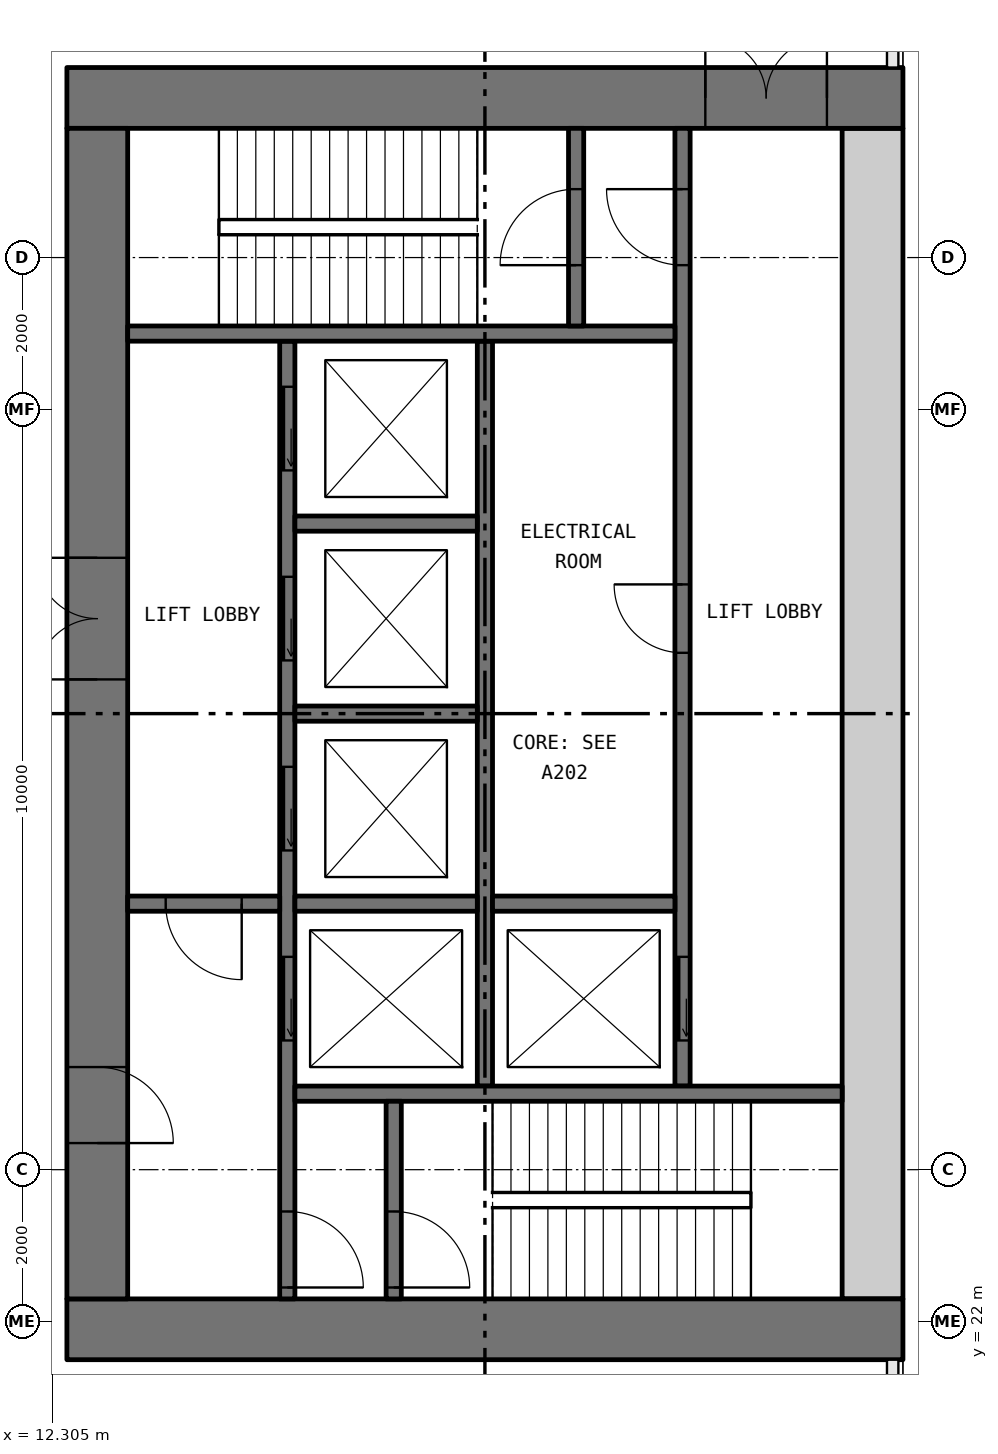
"""IFC4 building model, lengths in metres.
Left out: names, types, materials, properties, quantities, classifications, styles, units other than length and angle.
Written with IfcOpenShell. Run it as: python <this file> out.ifc"""

import sys

from ifc_helpers import new_model, si_unit, direction, frame, frame_2d, origin, place, context, subcontext, project, spatial, rectangle, extrude, element, fill, save


model = new_model("IFC4")
c1 = context("Model", 3, precision=1e-05, world=origin(), true_north=direction((0.0, 1.0)))
c2 = subcontext(c1, "Body", "Model", "MODEL_VIEW")
j1 = project(units=[si_unit("LENGTHUNIT", "METRE"), si_unit("PLANEANGLEUNIT", "RADIAN")], contexts=[c1])
p1 = place(None, origin())
s1 = spatial("IfcSite", under=j1, at=p1, CompositionType="ELEMENT")
p2 = place(p1, origin())
s2 = spatial("IfcBuilding", under=s1, at=p2, CompositionType="ELEMENT")
p3 = place(p2, frame((0.0, 0.0, 6.0)))
s3 = spatial("IfcBuildingStorey", under=s2, at=p3, CompositionType="ELEMENT", Elevation=6.0)
p4 = place(p3, frame((12.5, 21.9, 0.0), z_axis=(0.0, 0.0, 1.0), x_axis=(1.0, 0.0, 0.0)))
e1 = element("IfcWall", 1, at=p4, inside=s3, PredefinedType="SHEAR", context=c2, shape_type="SweptSolid", body=[
    extrude(rectangle(XDim=11.0, YDim=0.8, at=frame_2d((5.5, 0.0))), origin(), (0.0, 0.0, 1.0), 5.6),
])
p5 = place(p3, frame((12.5, 38.1, 0.0), z_axis=(0.0, 0.0, 1.0), x_axis=(1.0, 0.0, 0.0)))
e2 = element("IfcWall", 2, at=p5, inside=s3, PredefinedType="SHEAR", context=c2, shape_type="SweptSolid", body=[
    extrude(rectangle(XDim=11.0, YDim=0.8, at=frame_2d((5.5, 0.0))), origin(), (0.0, 0.0, 1.0), 5.6),
])
p6 = place(p5, frame((8.4, 0.0, 0.0)))
e3 = element("IfcOpeningElement", 3, at=p6, cuts=e2, PredefinedType="OPENING", context=c2, shape_type="SweptSolid", body=[
    extrude(rectangle(XDim=1.6, YDim=2.1, at=frame_2d((0.8, 1.05))), frame((0.0, 0.41, 0.0), z_axis=(0.0, -1.0, 0.0), x_axis=(1.0, 0.0, 0.0)), (0.0, 0.0, 1.0), 0.82),
])
p7 = place(p3, frame((12.9, 22.3, 0.0), z_axis=(0.0, 0.0, 1.0), x_axis=(0.0, 1.0, 0.0)))
e4 = element("IfcWall", 4, at=p7, inside=s3, PredefinedType="SHEAR", context=c2, shape_type="SweptSolid", body=[
    extrude(rectangle(XDim=15.4, YDim=0.8, at=frame_2d((7.7, 0.0))), origin(), (0.0, 0.0, 1.0), 5.6),
])
p8 = place(p7, frame((8.15, 0.0, 0.0)))
e5 = element("IfcOpeningElement", 5, at=p8, cuts=e4, PredefinedType="OPENING", context=c2, shape_type="SweptSolid", body=[
    extrude(rectangle(XDim=1.6, YDim=2.1, at=frame_2d((0.8, 1.05))), frame((0.0, 0.41, 0.0), z_axis=(0.0, -1.0, 0.0), x_axis=(1.0, 0.0, 0.0)), (0.0, 0.0, 1.0), 0.82),
])
p9 = place(p7, frame((2.05, 0.0, 0.0)))
e6 = element("IfcOpeningElement", 6, at=p9, cuts=e4, PredefinedType="OPENING", context=c2, shape_type="SweptSolid", body=[
    extrude(rectangle(XDim=1.0, YDim=2.1, at=frame_2d((0.5, 1.05))), frame((0.0, 0.41, 0.0), z_axis=(0.0, -1.0, 0.0), x_axis=(1.0, 0.0, 0.0)), (0.0, 0.0, 1.0), 0.82),
])
p10 = place(p3, frame((23.1, 22.3, 0.0), z_axis=(0.0, 0.0, 1.0), x_axis=(0.0, 1.0, 0.0)))
e7 = element("IfcWall", 7, at=p10, inside=s3, PredefinedType="SHEAR", context=c2, shape_type="SweptSolid", body=[
    extrude(rectangle(XDim=15.4, YDim=0.8, at=frame_2d((7.7, 0.0))), origin(), (0.0, 0.0, 1.0), 5.6),
])
p11 = place(p3, frame((15.4, 22.3, 0.0), z_axis=(0.0, 0.0, 1.0), x_axis=(0.0, 1.0, 0.0)))
e8 = element("IfcWall", 8, at=p11, inside=s3, PredefinedType="SOLIDWALL", context=c2, shape_type="SweptSolid", body=[
    extrude(rectangle(XDim=12.6, YDim=0.2, at=frame_2d((6.3, 0.0))), origin(), (0.0, 0.0, 1.0), 5.6),
])
p12 = place(p11, frame((3.4, 0.0, 0.0)))
e9 = element("IfcOpeningElement", 9, at=p12, cuts=e8, PredefinedType="OPENING", context=c2, shape_type="SweptSolid", body=[
    extrude(rectangle(XDim=1.1, YDim=2.1, at=frame_2d((0.55, 1.05))), frame((0.0, 0.11, 0.0), z_axis=(0.0, -1.0, 0.0), x_axis=(1.0, 0.0, 0.0)), (0.0, 0.0, 1.0), 0.22),
])
p13 = place(p11, frame((5.9, 0.0, 0.0)))
e10 = element("IfcOpeningElement", 10, at=p13, cuts=e8, PredefinedType="OPENING", context=c2, shape_type="SweptSolid", body=[
    extrude(rectangle(XDim=1.1, YDim=2.1, at=frame_2d((0.55, 1.05))), frame((0.0, 0.11, 0.0), z_axis=(0.0, -1.0, 0.0), x_axis=(1.0, 0.0, 0.0)), (0.0, 0.0, 1.0), 0.22),
])
p14 = place(p11, frame((8.4, 0.0, 0.0)))
e11 = element("IfcOpeningElement", 11, at=p14, cuts=e8, PredefinedType="OPENING", context=c2, shape_type="SweptSolid", body=[
    extrude(rectangle(XDim=1.1, YDim=2.1, at=frame_2d((0.55, 1.05))), frame((0.0, 0.11, 0.0), z_axis=(0.0, -1.0, 0.0), x_axis=(1.0, 0.0, 0.0)), (0.0, 0.0, 1.0), 0.22),
])
p15 = place(p11, frame((10.9, 0.0, 0.0)))
e12 = element("IfcOpeningElement", 12, at=p15, cuts=e8, PredefinedType="OPENING", context=c2, shape_type="SweptSolid", body=[
    extrude(rectangle(XDim=1.1, YDim=2.1, at=frame_2d((0.55, 1.05))), frame((0.0, 0.11, 0.0), z_axis=(0.0, -1.0, 0.0), x_axis=(1.0, 0.0, 0.0)), (0.0, 0.0, 1.0), 0.22),
])
p16 = place(p11, frame((0.15, 0.0, 0.0)))
e13 = element("IfcOpeningElement", 13, at=p16, cuts=e8, PredefinedType="OPENING", context=c2, shape_type="SweptSolid", body=[
    extrude(rectangle(XDim=1.0, YDim=2.1, at=frame_2d((0.5, 1.05))), frame((0.0, 0.11, 0.0), z_axis=(0.0, -1.0, 0.0), x_axis=(1.0, 0.0, 0.0)), (0.0, 0.0, 1.0), 0.22),
])
p17 = place(p3, frame((20.6, 25.1, 0.0), z_axis=(0.0, 0.0, 1.0), x_axis=(0.0, 1.0, 0.0)))
e14 = element("IfcWall", 14, at=p17, inside=s3, PredefinedType="SOLIDWALL", context=c2, shape_type="SweptSolid", body=[
    extrude(rectangle(XDim=12.6, YDim=0.2, at=frame_2d((6.3, 0.0))), origin(), (0.0, 0.0, 1.0), 5.6),
])
p18 = place(p17, frame((0.6, 0.0, 0.0)))
e15 = element("IfcOpeningElement", 15, at=p18, cuts=e14, PredefinedType="OPENING", context=c2, shape_type="SweptSolid", body=[
    extrude(rectangle(XDim=1.1, YDim=2.1, at=frame_2d((0.55, 1.05))), frame((0.0, 0.11, 0.0), z_axis=(0.0, -1.0, 0.0), x_axis=(1.0, 0.0, 0.0)), (0.0, 0.0, 1.0), 0.22),
])
p19 = place(p17, frame((10.8, 0.0, 0.0)))
e16 = element("IfcOpeningElement", 16, at=p19, cuts=e14, PredefinedType="OPENING", context=c2, shape_type="SweptSolid", body=[
    extrude(rectangle(XDim=1.0, YDim=2.1, at=frame_2d((0.5, 1.05))), frame((0.0, 0.11, 0.0), z_axis=(0.0, -1.0, 0.0), x_axis=(1.0, 0.0, 0.0)), (0.0, 0.0, 1.0), 0.22),
])
p20 = place(p17, frame((5.7, 0.0, 0.0)))
e17 = element("IfcOpeningElement", 17, at=p20, cuts=e14, PredefinedType="OPENING", context=c2, shape_type="SweptSolid", body=[
    extrude(rectangle(XDim=0.9, YDim=2.1, at=frame_2d((0.45, 1.05))), frame((0.0, 0.11, 0.0), z_axis=(0.0, -1.0, 0.0), x_axis=(1.0, 0.0, 0.0)), (0.0, 0.0, 1.0), 0.22),
])
p21 = place(p3, frame((18.0, 25.1, 0.0), z_axis=(0.0, 0.0, 1.0), x_axis=(0.0, 1.0, 0.0)))
e18 = element("IfcWall", 18, at=p21, inside=s3, PredefinedType="SOLIDWALL", context=c2, shape_type="SweptSolid", body=[
    extrude(rectangle(XDim=9.8, YDim=0.2, at=frame_2d((4.9, 0.0))), origin(), (0.0, 0.0, 1.0), 5.6),
])
for number, where, z_axis, x_axis in (
    (19, (15.5, 25.0, 0.0), (0.0, 0.0, 1.0), (1.0, 0.0, 0.0)),
    (20, (13.3, 35.0, 0.0), (0.0, 0.0, 1.0), (1.0, 0.0, 0.0)),
):
    element("IfcWall", number, at=place(p3, frame(where, z_axis=z_axis, x_axis=x_axis)), inside=s3, PredefinedType="SOLIDWALL", context=c2, shape_type="SweptSolid", body=[
        extrude(rectangle(XDim=7.2, YDim=0.2, at=frame_2d((3.6, 0.0))), origin(), (0.0, 0.0, 1.0), 5.6),
    ])
p22 = place(p3, frame((13.3, 27.5, 0.0), z_axis=(0.0, 0.0, 1.0), x_axis=(1.0, 0.0, 0.0)))
e21 = element("IfcWall", 21, at=p22, inside=s3, PredefinedType="SOLIDWALL", context=c2, shape_type="SweptSolid", body=[
    extrude(rectangle(XDim=2.0, YDim=0.2, at=frame_2d((1.0, 0.0))), origin(), (0.0, 0.0, 1.0), 5.6),
])
p23 = place(p22, frame((0.5, 0.0, 0.0)))
e22 = element("IfcOpeningElement", 22, at=p23, cuts=e21, PredefinedType="OPENING", context=c2, shape_type="SweptSolid", body=[
    extrude(rectangle(XDim=1.0, YDim=2.1, at=frame_2d((0.5, 1.05))), frame((0.0, 0.11, 0.0), z_axis=(0.0, -1.0, 0.0), x_axis=(1.0, 0.0, 0.0)), (0.0, 0.0, 1.0), 0.22),
])
p24 = place(p3, frame((16.8, 22.3, 0.0), z_axis=(0.0, 0.0, 1.0), x_axis=(0.0, 1.0, 0.0)))
e23 = element("IfcWall", 23, at=p24, inside=s3, PredefinedType="SOLIDWALL", context=c2, shape_type="SweptSolid", body=[
    extrude(rectangle(XDim=2.6, YDim=0.2, at=frame_2d((1.3, 0.0))), origin(), (0.0, 0.0, 1.0), 5.6),
])
p25 = place(p24, frame((0.15, 0.0, 0.0)))
e24 = element("IfcOpeningElement", 24, at=p25, cuts=e23, PredefinedType="OPENING", context=c2, shape_type="SweptSolid", body=[
    extrude(rectangle(XDim=1.0, YDim=2.1, at=frame_2d((0.5, 1.05))), frame((0.0, 0.11, 0.0), z_axis=(0.0, -1.0, 0.0), x_axis=(1.0, 0.0, 0.0)), (0.0, 0.0, 1.0), 0.22),
])
p26 = place(p3, frame((19.2, 35.1, 0.0), z_axis=(0.0, 0.0, 1.0), x_axis=(0.0, 1.0, 0.0)))
e25 = element("IfcWall", 25, at=p26, inside=s3, PredefinedType="SOLIDWALL", context=c2, shape_type="SweptSolid", body=[
    extrude(rectangle(XDim=2.6, YDim=0.2, at=frame_2d((1.3, 0.0))), origin(), (0.0, 0.0, 1.0), 5.6),
])
p27 = place(p26, frame((0.8, 0.0, 0.0)))
e26 = element("IfcOpeningElement", 26, at=p27, cuts=e25, PredefinedType="OPENING", context=c2, shape_type="SweptSolid", body=[
    extrude(rectangle(XDim=1.0, YDim=2.1, at=frame_2d((0.5, 1.05))), frame((0.0, 0.11, 0.0), z_axis=(0.0, -1.0, 0.0), x_axis=(1.0, 0.0, 0.0)), (0.0, 0.0, 1.0), 0.22),
])
for number, where, z_axis, x_axis in (
    (27, (15.5, 27.5, 0.0), (0.0, 0.0, 1.0), (1.0, 0.0, 0.0)),
    (28, (15.5, 30.0, 0.0), (0.0, 0.0, 1.0), (1.0, 0.0, 0.0)),
    (29, (15.5, 32.5, 0.0), (0.0, 0.0, 1.0), (1.0, 0.0, 0.0)),
    (30, (18.1, 27.5, 0.0), (0.0, 0.0, 1.0), (1.0, 0.0, 0.0)),
):
    element("IfcWall", number, at=place(p3, frame(where, z_axis=z_axis, x_axis=x_axis)), inside=s3, PredefinedType="SOLIDWALL", context=c2, shape_type="SweptSolid", body=[
        extrude(rectangle(XDim=2.4, YDim=0.2, at=frame_2d((1.2, 0.0))), origin(), (0.0, 0.0, 1.0), 5.6),
    ])
p28 = place(p18, origin())
e31 = element("IfcDoor", 31, at=p28, inside=s3, OperationType="SLIDING_TO_LEFT", PredefinedType="DOOR", context=c2, shape_type="SweptSolid", body=[
    extrude(rectangle(XDim=1.1, YDim=2.1, at=frame_2d((0.55, 1.05))), frame((0.0, 0.025, 0.0), z_axis=(0.0, -1.0, 0.0), x_axis=(1.0, 0.0, 0.0)), (0.0, 0.0, 1.0), 0.05),
])
fill(e15, e31)
p29 = place(p12, origin())
e32 = element("IfcDoor", 32, at=p29, inside=s3, OperationType="SLIDING_TO_LEFT", PredefinedType="DOOR", context=c2, shape_type="SweptSolid", body=[
    extrude(rectangle(XDim=1.1, YDim=2.1, at=frame_2d((0.55, 1.05))), frame((0.0, 0.025, 0.0), z_axis=(0.0, -1.0, 0.0), x_axis=(1.0, 0.0, 0.0)), (0.0, 0.0, 1.0), 0.05),
])
fill(e9, e32)
p30 = place(p13, origin())
e33 = element("IfcDoor", 33, at=p30, inside=s3, OperationType="SLIDING_TO_LEFT", PredefinedType="DOOR", context=c2, shape_type="SweptSolid", body=[
    extrude(rectangle(XDim=1.1, YDim=2.1, at=frame_2d((0.55, 1.05))), frame((0.0, 0.025, 0.0), z_axis=(0.0, -1.0, 0.0), x_axis=(1.0, 0.0, 0.0)), (0.0, 0.0, 1.0), 0.05),
])
fill(e10, e33)
p31 = place(p14, origin())
e34 = element("IfcDoor", 34, at=p31, inside=s3, OperationType="SLIDING_TO_LEFT", PredefinedType="DOOR", context=c2, shape_type="SweptSolid", body=[
    extrude(rectangle(XDim=1.1, YDim=2.1, at=frame_2d((0.55, 1.05))), frame((0.0, 0.025, 0.0), z_axis=(0.0, -1.0, 0.0), x_axis=(1.0, 0.0, 0.0)), (0.0, 0.0, 1.0), 0.05),
])
fill(e11, e34)
p32 = place(p15, origin())
e35 = element("IfcDoor", 35, at=p32, inside=s3, OperationType="SLIDING_TO_LEFT", PredefinedType="DOOR", context=c2, shape_type="SweptSolid", body=[
    extrude(rectangle(XDim=1.1, YDim=2.1, at=frame_2d((0.55, 1.05))), frame((0.0, 0.025, 0.0), z_axis=(0.0, -1.0, 0.0), x_axis=(1.0, 0.0, 0.0)), (0.0, 0.0, 1.0), 0.05),
])
fill(e12, e35)
p33 = place(p25, frame((1.0, 0.0, 0.0), x_axis=(-1.0, 0.0, 0.0)))
e36 = element("IfcDoor", 36, at=p33, inside=s3, OperationType="SINGLE_SWING_LEFT", PredefinedType="DOOR", context=c2, shape_type="SweptSolid", body=[
    extrude(rectangle(XDim=1.0, YDim=2.1, at=frame_2d((0.5, 1.05))), frame((0.0, 0.025, 0.0), z_axis=(0.0, -1.0, 0.0), x_axis=(1.0, 0.0, 0.0)), (0.0, 0.0, 1.0), 0.05),
])
fill(e24, e36)
p34 = place(p16, frame((1.0, 0.0, 0.0), x_axis=(-1.0, 0.0, 0.0)))
e37 = element("IfcDoor", 37, at=p34, inside=s3, OperationType="SINGLE_SWING_LEFT", PredefinedType="DOOR", context=c2, shape_type="SweptSolid", body=[
    extrude(rectangle(XDim=1.0, YDim=2.1, at=frame_2d((0.5, 1.05))), frame((0.0, 0.025, 0.0), z_axis=(0.0, -1.0, 0.0), x_axis=(1.0, 0.0, 0.0)), (0.0, 0.0, 1.0), 0.05),
])
fill(e13, e37)
p35 = place(p19, origin())
e38 = element("IfcDoor", 38, at=p35, inside=s3, OperationType="SINGLE_SWING_LEFT", PredefinedType="DOOR", context=c2, shape_type="SweptSolid", body=[
    extrude(rectangle(XDim=1.0, YDim=2.1, at=frame_2d((0.5, 1.05))), frame((0.0, 0.025, 0.0), z_axis=(0.0, -1.0, 0.0), x_axis=(1.0, 0.0, 0.0)), (0.0, 0.0, 1.0), 0.05),
])
fill(e16, e38)
p36 = place(p27, origin())
e39 = element("IfcDoor", 39, at=p36, inside=s3, OperationType="SINGLE_SWING_RIGHT", PredefinedType="DOOR", context=c2, shape_type="SweptSolid", body=[
    extrude(rectangle(XDim=1.0, YDim=2.1, at=frame_2d((0.5, 1.05))), frame((0.0, 0.025, 0.0), z_axis=(0.0, -1.0, 0.0), x_axis=(1.0, 0.0, 0.0)), (0.0, 0.0, 1.0), 0.05),
])
fill(e26, e39)
p37 = place(p23, frame((1.0, 0.0, 0.0), x_axis=(-1.0, 0.0, 0.0)))
e40 = element("IfcDoor", 40, at=p37, inside=s3, OperationType="SINGLE_SWING_RIGHT", PredefinedType="DOOR", context=c2, shape_type="SweptSolid", body=[
    extrude(rectangle(XDim=1.0, YDim=2.1, at=frame_2d((0.5, 1.05))), frame((0.0, 0.025, 0.0), z_axis=(0.0, -1.0, 0.0), x_axis=(1.0, 0.0, 0.0)), (0.0, 0.0, 1.0), 0.05),
])
fill(e22, e40)
p38 = place(p8, origin())
e41 = element("IfcDoor", 41, at=p38, inside=s3, OperationType="DOUBLE_DOOR_SINGLE_SWING", PredefinedType="DOOR", context=c2, shape_type="SweptSolid", body=[
    extrude(rectangle(XDim=1.6, YDim=2.1, at=frame_2d((0.8, 1.05))), frame((0.0, 0.025, 0.0), z_axis=(0.0, -1.0, 0.0), x_axis=(1.0, 0.0, 0.0)), (0.0, 0.0, 1.0), 0.05),
])
fill(e5, e41)
p39 = place(p9, frame((1.0, 0.0, 0.0), x_axis=(-1.0, 0.0, 0.0)))
e42 = element("IfcDoor", 42, at=p39, inside=s3, OperationType="SINGLE_SWING_LEFT", PredefinedType="DOOR", context=c2, shape_type="SweptSolid", body=[
    extrude(rectangle(XDim=1.0, YDim=2.1, at=frame_2d((0.5, 1.05))), frame((0.0, 0.025, 0.0), z_axis=(0.0, -1.0, 0.0), x_axis=(1.0, 0.0, 0.0)), (0.0, 0.0, 1.0), 0.05),
])
fill(e6, e42)
p40 = place(p6, origin())
e43 = element("IfcDoor", 43, at=p40, inside=s3, OperationType="DOUBLE_DOOR_SINGLE_SWING", PredefinedType="DOOR", context=c2, shape_type="SweptSolid", body=[
    extrude(rectangle(XDim=1.6, YDim=2.1, at=frame_2d((0.8, 1.05))), frame((0.0, 0.025, 0.0), z_axis=(0.0, -1.0, 0.0), x_axis=(1.0, 0.0, 0.0)), (0.0, 0.0, 1.0), 0.05),
])
fill(e3, e43)
p41 = place(p20, origin())
e44 = element("IfcDoor", 44, at=p41, inside=s3, OperationType="SINGLE_SWING_LEFT", PredefinedType="DOOR", context=c2, shape_type="SweptSolid", body=[
    extrude(rectangle(XDim=0.9, YDim=2.1, at=frame_2d((0.45, 1.05))), frame((0.0, 0.025, 0.0), z_axis=(0.0, -1.0, 0.0), x_axis=(1.0, 0.0, 0.0)), (0.0, 0.0, 1.0), 0.05),
])
fill(e17, e44)
save(model, sys.argv[1])
